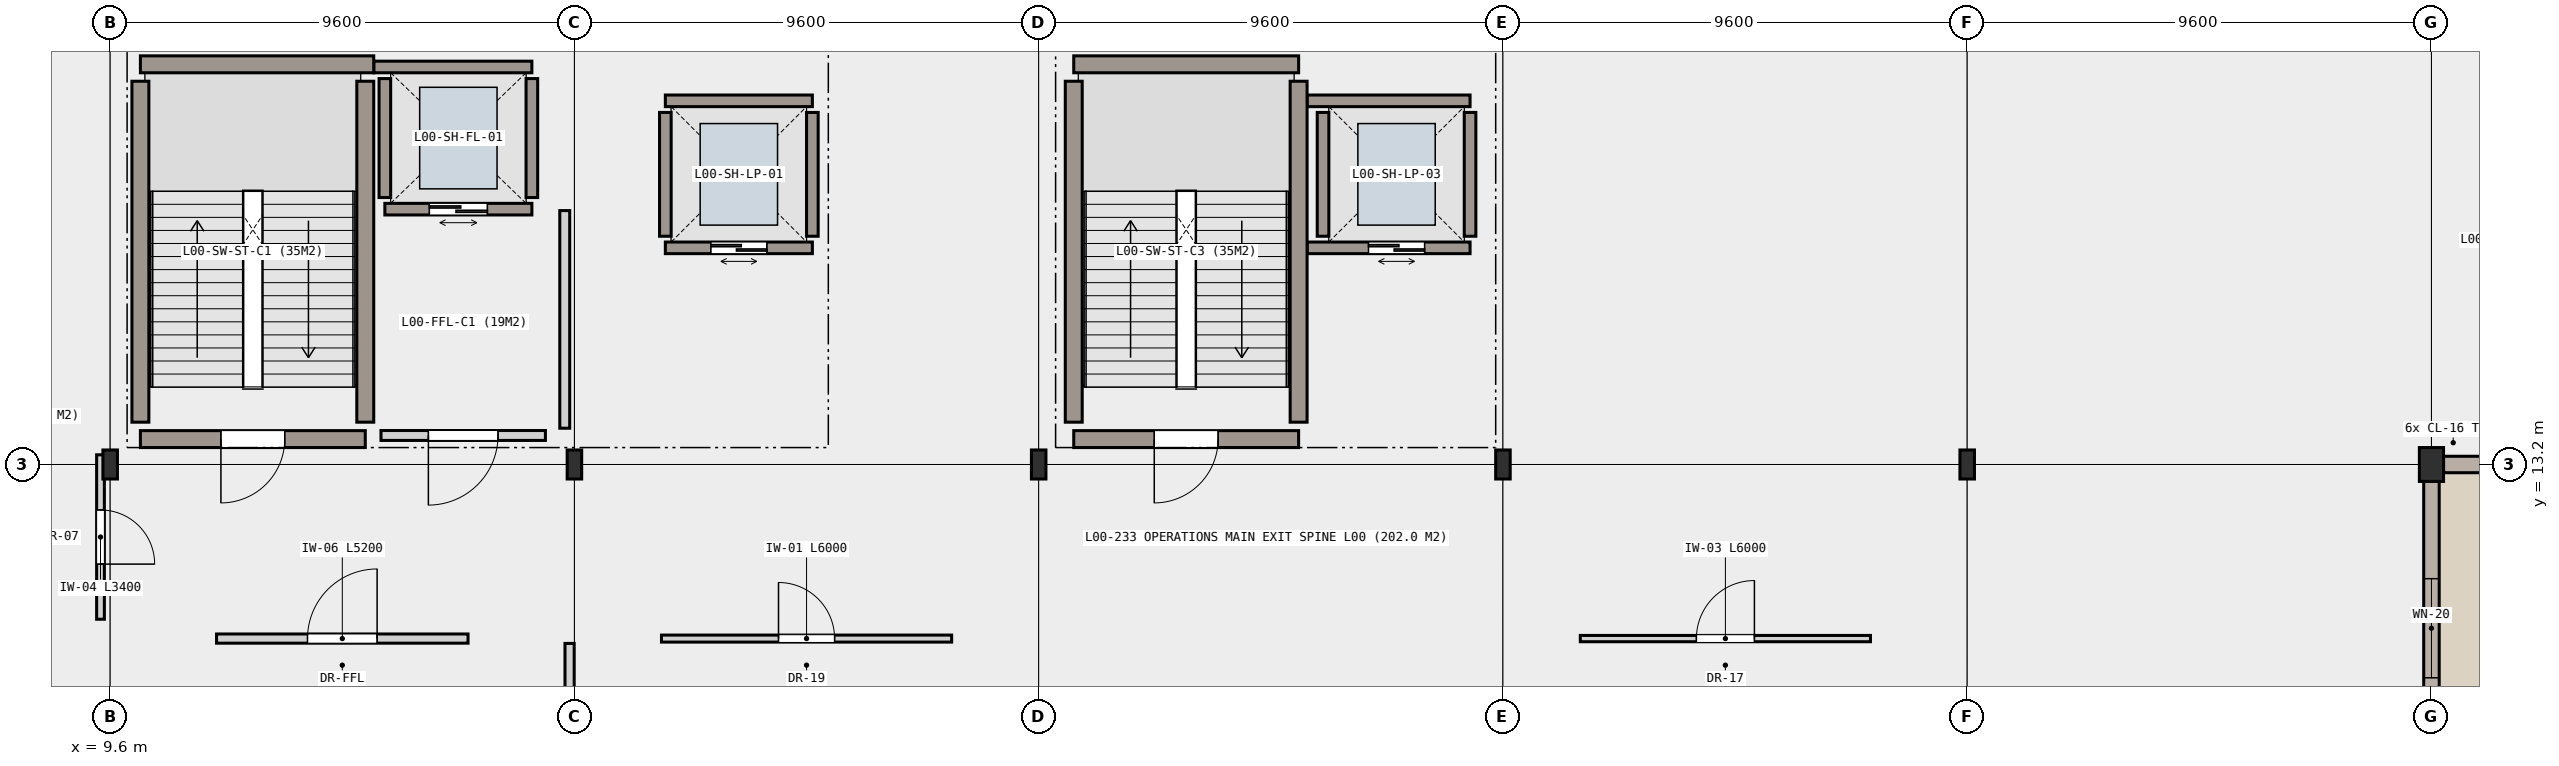
"""IFC4 building model, lengths in metres.
Left out: names, types, materials, properties, quantities, classifications, styles, units other than length and angle.
Written with IfcOpenShell. Run it as: python <this file> out.ifc"""

import sys

from ifc_helpers import new_model, si_unit, direction, frame, frame_2d, origin, origin_2d, place, context, subcontext, project, spatial, rectangle, hollow_rectangle, i_section, extrude, element, fill, save


model = new_model("IFC4")
c1 = context("Model", 3, precision=1e-05, world=origin(), true_north=direction((0.0, 1.0)))
c2 = subcontext(c1, "Body", "Model", "MODEL_VIEW")
j1 = project(units=[si_unit("LENGTHUNIT", "METRE"), si_unit("PLANEANGLEUNIT", "RADIAN")], contexts=[c1])
p1 = place(None, origin())
s1 = spatial("IfcSite", under=j1, at=p1, CompositionType="ELEMENT")
p2 = place(p1, origin())
s2 = spatial("IfcBuilding", under=s1, at=p2, CompositionType="ELEMENT")
p3 = place(p2, origin())
s3 = spatial("IfcBuildingStorey", under=s2, at=p3, CompositionType="ELEMENT", Elevation=0.0)
for number, where, z_axis, x_axis in (
    (1, (9.6, 13.2, 0.0), (0.0, 0.0, 1.0), (1.0, 0.0, 0.0)),
    (2, (19.2, 13.2, 0.0), (0.0, 0.0, 1.0), (1.0, 0.0, 0.0)),
    (3, (28.8, 13.2, 0.0), (0.0, 0.0, 1.0), (1.0, 0.0, 0.0)),
    (4, (38.4, 13.2, 0.0), (0.0, 0.0, 1.0), (1.0, 0.0, 0.0)),
    (5, (48.0, 13.2, 0.0), (0.0, 0.0, 1.0), (1.0, 0.0, 0.0)),
):
    element("IfcColumn", number, at=place(p3, frame(where, z_axis=z_axis, x_axis=x_axis)), inside=s3, PredefinedType="COLUMN", context=c2, shape_type="SweptSolid", body=[
        extrude(i_section(OverallWidth=0.3, OverallDepth=0.6, WebThickness=0.015, FlangeThickness=0.03, FilletRadius=0.027, at=origin_2d()), origin(), (0.0, 0.0, 1.0), 5.4),
    ])
p4 = place(p3, frame((57.6, 13.2, 0.0), z_axis=(0.0, 0.0, 1.0), x_axis=(1.0, 0.0, 0.0)))
e6 = element("IfcColumn", 6, at=p4, inside=s3, PredefinedType="COLUMN", context=c2, shape_type="SweptSolid", body=[
    extrude(hollow_rectangle(XDim=0.5, YDim=0.7, WallThickness=0.032, at=origin_2d()), origin(), (0.0, 0.0, 1.0), 5.4),
])
p5 = place(p3, frame((57.6, 12.85, 0.0), z_axis=(0.0, 0.0, 1.0), x_axis=(0.0, -1.0, 0.0)))
e7 = element("IfcWall", 7, at=p5, inside=s3, PredefinedType="SOLIDWALL", context=c2, shape_type="SweptSolid", body=[
    extrude(rectangle(XDim=6.072, YDim=0.32, at=frame_2d((3.036, 0.0))), origin(), (0.0, 0.0, 1.0), 4.59),
])
p6 = place(p5, frame((2.011, 0.0, 0.85)))
e8 = element("IfcOpeningElement", 8, at=p6, cuts=e7, PredefinedType="OPENING", context=c2, shape_type="SweptSolid", body=[
    extrude(rectangle(XDim=2.05, YDim=2.15, at=frame_2d((1.025, 1.075))), frame((0.0, 0.17, 0.0), z_axis=(0.0, -1.0, 0.0), x_axis=(1.0, 0.0, 0.0)), (0.0, 0.0, 1.0), 0.34),
])
p7 = place(p3, frame((66.95, 13.2, 0.0), z_axis=(0.0, 0.0, 1.0), x_axis=(-1.0, 0.0, 0.0)))
e9 = element("IfcWall", 9, at=p7, inside=s3, PredefinedType="SOLIDWALL", context=c2, shape_type="SweptSolid", body=[
    extrude(rectangle(XDim=9.1, YDim=0.34, at=frame_2d((4.55, 0.0))), origin(), (0.0, 0.0, 1.0), 4.49),
])
p8 = place(p7, frame((3.45, 0.0, 0.0)))
e10 = element("IfcOpeningElement", 10, at=p8, cuts=e9, PredefinedType="OPENING", context=c2, shape_type="SweptSolid", body=[
    extrude(rectangle(XDim=2.2, YDim=2.55, at=frame_2d((1.1, 1.275))), frame((0.0, 0.18, 0.0), z_axis=(0.0, -1.0, 0.0), x_axis=(1.0, 0.0, 0.0)), (0.0, 0.0, 1.0), 0.36),
])
p9 = place(p3, frame((18.32, 18.48, 0.0), z_axis=(0.0, 0.0, 1.0), x_axis=(-1.0, 0.0, 0.0)))
e11 = element("IfcWall", 11, at=p9, inside=s3, PredefinedType="SHEAR", context=c2, shape_type="SweptSolid", body=[
    extrude(rectangle(XDim=3.04, YDim=0.24, at=frame_2d((1.52, 0.0))), origin(), (0.0, 0.0, 1.0), 5.12),
])
p10 = place(p9, frame((0.92, 0.0, 0.0)))
e12 = element("IfcOpeningElement", 12, at=p10, cuts=e11, PredefinedType="OPENING", context=c2, shape_type="SweptSolid", body=[
    extrude(rectangle(XDim=1.2, YDim=2.15, at=frame_2d((0.6, 1.075))), frame((0.0, 0.13, 0.0), z_axis=(0.0, -1.0, 0.0), x_axis=(1.0, 0.0, 0.0)), (0.0, 0.0, 1.0), 0.26),
])
p11 = place(p3, frame((15.05, 21.42, 0.0), z_axis=(0.0, 0.0, 1.0), x_axis=(1.0, 0.0, 0.0)))
e13 = element("IfcWall", 13, at=p11, inside=s3, PredefinedType="SHEAR", context=c2, shape_type="SweptSolid", body=[
    extrude(rectangle(XDim=3.27, YDim=0.24, at=frame_2d((1.635, 0.0))), origin(), (0.0, 0.0, 1.0), 5.12),
])
for number, where, z_axis, x_axis in (
    (14, (15.28, 18.72, 0.0), (0.0, 0.0, 1.0), (0.0, 1.0, 0.0)),
    (15, (18.32, 21.18, 0.0), (0.0, 0.0, 1.0), (0.0, -1.0, 0.0)),
):
    element("IfcWall", number, at=place(p3, frame(where, z_axis=z_axis, x_axis=x_axis)), inside=s3, PredefinedType="SHEAR", context=c2, shape_type="SweptSolid", body=[
        extrude(rectangle(XDim=2.46, YDim=0.24, at=frame_2d((1.23, 0.0))), origin(), (0.0, 0.0, 1.0), 5.12),
    ])
p12 = place(p3, frame((24.12, 17.68, 0.0), z_axis=(0.0, 0.0, 1.0), x_axis=(-1.0, 0.0, 0.0)))
e16 = element("IfcWall", 16, at=p12, inside=s3, PredefinedType="SHEAR", context=c2, shape_type="SweptSolid", body=[
    extrude(rectangle(XDim=3.04, YDim=0.24, at=frame_2d((1.52, 0.0))), origin(), (0.0, 0.0, 1.0), 5.12),
])
p13 = place(p12, frame((0.94, 0.0, 0.0)))
e17 = element("IfcOpeningElement", 17, at=p13, cuts=e16, PredefinedType="OPENING", context=c2, shape_type="SweptSolid", body=[
    extrude(rectangle(XDim=1.16, YDim=2.15, at=frame_2d((0.58, 1.075))), frame((0.0, 0.13, 0.0), z_axis=(0.0, -1.0, 0.0), x_axis=(1.0, 0.0, 0.0)), (0.0, 0.0, 1.0), 0.26),
])
p14 = place(p3, frame((21.08, 20.72, 0.0), z_axis=(0.0, 0.0, 1.0), x_axis=(1.0, 0.0, 0.0)))
e18 = element("IfcWall", 18, at=p14, inside=s3, PredefinedType="SHEAR", context=c2, shape_type="SweptSolid", body=[
    extrude(rectangle(XDim=3.04, YDim=0.24, at=frame_2d((1.52, 0.0))), origin(), (0.0, 0.0, 1.0), 5.12),
])
for number, where, z_axis, x_axis in (
    (19, (21.08, 17.92, 0.0), (0.0, 0.0, 1.0), (0.0, 1.0, 0.0)),
    (20, (24.12, 20.48, 0.0), (0.0, 0.0, 1.0), (0.0, -1.0, 0.0)),
):
    element("IfcWall", number, at=place(p3, frame(where, z_axis=z_axis, x_axis=x_axis)), inside=s3, PredefinedType="SHEAR", context=c2, shape_type="SweptSolid", body=[
        extrude(rectangle(XDim=2.56, YDim=0.24, at=frame_2d((1.28, 0.0))), origin(), (0.0, 0.0, 1.0), 5.12),
    ])
p15 = place(p3, frame((37.72, 17.68, 0.0), z_axis=(0.0, 0.0, 1.0), x_axis=(-1.0, 0.0, 0.0)))
e21 = element("IfcWall", 21, at=p15, inside=s3, PredefinedType="SHEAR", context=c2, shape_type="SweptSolid", body=[
    extrude(rectangle(XDim=3.37, YDim=0.24, at=frame_2d((1.685, 0.0))), origin(), (0.0, 0.0, 1.0), 5.12),
])
p16 = place(p15, frame((0.94, 0.0, 0.0)))
e22 = element("IfcOpeningElement", 22, at=p16, cuts=e21, PredefinedType="OPENING", context=c2, shape_type="SweptSolid", body=[
    extrude(rectangle(XDim=1.16, YDim=2.15, at=frame_2d((0.58, 1.075))), frame((0.0, 0.13, 0.0), z_axis=(0.0, -1.0, 0.0), x_axis=(1.0, 0.0, 0.0)), (0.0, 0.0, 1.0), 0.26),
])
p17 = place(p3, frame((34.35, 20.72, 0.0), z_axis=(0.0, 0.0, 1.0), x_axis=(1.0, 0.0, 0.0)))
e23 = element("IfcWall", 23, at=p17, inside=s3, PredefinedType="SHEAR", context=c2, shape_type="SweptSolid", body=[
    extrude(rectangle(XDim=3.37, YDim=0.24, at=frame_2d((1.685, 0.0))), origin(), (0.0, 0.0, 1.0), 5.12),
])
for number, where, z_axis, x_axis in (
    (24, (34.68, 17.92, 0.0), (0.0, 0.0, 1.0), (0.0, 1.0, 0.0)),
    (25, (37.72, 20.48, 0.0), (0.0, 0.0, 1.0), (0.0, -1.0, 0.0)),
):
    element("IfcWall", number, at=place(p3, frame(where, z_axis=z_axis, x_axis=x_axis)), inside=s3, PredefinedType="SHEAR", context=c2, shape_type="SweptSolid", body=[
        extrude(rectangle(XDim=2.56, YDim=0.24, at=frame_2d((1.28, 0.0))), origin(), (0.0, 0.0, 1.0), 5.12),
    ])
p18 = place(p3, frame((14.875, 13.725, 0.0), z_axis=(0.0, 0.0, 1.0), x_axis=(-1.0, 0.0, 0.0)))
e26 = element("IfcWall", 26, at=p18, inside=s3, PredefinedType="SHEAR", context=c2, shape_type="SweptSolid", body=[
    extrude(rectangle(XDim=4.65, YDim=0.35, at=frame_2d((2.325, 0.0))), origin(), (0.0, 0.0, 1.0), 5.12),
])
p19 = place(p18, frame((1.665, 0.0, 0.0)))
e27 = element("IfcOpeningElement", 27, at=p19, cuts=e26, PredefinedType="OPENING", context=c2, shape_type="SweptSolid", body=[
    extrude(rectangle(XDim=1.32, YDim=2.15, at=frame_2d((0.66, 1.075))), frame((0.0, 0.185, 0.0), z_axis=(0.0, -1.0, 0.0), x_axis=(1.0, 0.0, 0.0)), (0.0, 0.0, 1.0), 0.37),
])
p20 = place(p3, frame((10.225, 21.475, 0.0), z_axis=(0.0, 0.0, 1.0), x_axis=(1.0, 0.0, 0.0)))
e28 = element("IfcWall", 28, at=p20, inside=s3, PredefinedType="SHEAR", context=c2, shape_type="SweptSolid", body=[
    extrude(rectangle(XDim=4.825, YDim=0.35, at=frame_2d((2.413, 0.0))), origin(), (0.0, 0.0, 1.0), 5.12),
])
for number, where, z_axis, x_axis in (
    (29, (10.225, 14.075, 0.0), (0.0, 0.0, 1.0), (0.0, 1.0, 0.0)),
    (30, (14.875, 21.125, 0.0), (0.0, 0.0, 1.0), (0.0, -1.0, 0.0)),
):
    element("IfcWall", number, at=place(p3, frame(where, z_axis=z_axis, x_axis=x_axis)), inside=s3, PredefinedType="SHEAR", context=c2, shape_type="SweptSolid", body=[
        extrude(rectangle(XDim=7.05, YDim=0.35, at=frame_2d((3.525, 0.0))), origin(), (0.0, 0.0, 1.0), 5.12),
    ])
p21 = place(p3, frame((34.175, 13.725, 0.0), z_axis=(0.0, 0.0, 1.0), x_axis=(-1.0, 0.0, 0.0)))
e31 = element("IfcWall", 31, at=p21, inside=s3, PredefinedType="SHEAR", context=c2, shape_type="SweptSolid", body=[
    extrude(rectangle(XDim=4.65, YDim=0.35, at=frame_2d((2.325, 0.0))), origin(), (0.0, 0.0, 1.0), 5.12),
])
p22 = place(p21, frame((1.665, 0.0, 0.0)))
e32 = element("IfcOpeningElement", 32, at=p22, cuts=e31, PredefinedType="OPENING", context=c2, shape_type="SweptSolid", body=[
    extrude(rectangle(XDim=1.32, YDim=2.15, at=frame_2d((0.66, 1.075))), frame((0.0, 0.185, 0.0), z_axis=(0.0, -1.0, 0.0), x_axis=(1.0, 0.0, 0.0)), (0.0, 0.0, 1.0), 0.37),
])
p23 = place(p3, frame((29.525, 21.475, 0.0), z_axis=(0.0, 0.0, 1.0), x_axis=(1.0, 0.0, 0.0)))
e33 = element("IfcWall", 33, at=p23, inside=s3, PredefinedType="SHEAR", context=c2, shape_type="SweptSolid", body=[
    extrude(rectangle(XDim=4.65, YDim=0.35, at=frame_2d((2.325, 0.0))), origin(), (0.0, 0.0, 1.0), 5.12),
])
for number, where, z_axis, x_axis in (
    (34, (29.525, 14.075, 0.0), (0.0, 0.0, 1.0), (0.0, 1.0, 0.0)),
    (35, (34.175, 21.125, 0.0), (0.0, 0.0, 1.0), (0.0, -1.0, 0.0)),
):
    element("IfcWall", number, at=place(p3, frame(where, z_axis=z_axis, x_axis=x_axis)), inside=s3, PredefinedType="SHEAR", context=c2, shape_type="SweptSolid", body=[
        extrude(rectangle(XDim=7.05, YDim=0.35, at=frame_2d((3.525, 0.0))), origin(), (0.0, 0.0, 1.0), 5.12),
    ])
p24 = place(p3, frame((18.6, 13.8, 0.0), z_axis=(0.0, 0.0, 1.0), x_axis=(-1.0, 0.0, 0.0)))
e36 = element("IfcWall", 36, at=p24, inside=s3, PredefinedType="PARTITIONING", context=c2, shape_type="SweptSolid", body=[
    extrude(rectangle(XDim=3.4, YDim=0.205, at=frame_2d((1.7, 0.0))), origin(), (0.0, 0.0, 1.0), 5.12),
])
p25 = place(p24, frame((0.98, 0.0, 0.0)))
e37 = element("IfcOpeningElement", 37, at=p25, cuts=e36, PredefinedType="OPENING", context=c2, shape_type="SweptSolid", body=[
    extrude(rectangle(XDim=1.44, YDim=2.18, at=frame_2d((0.72, 1.09))), frame((0.0, 0.113, 0.0), z_axis=(0.0, -1.0, 0.0), x_axis=(1.0, 0.0, 0.0)), (0.0, 0.0, 1.0), 0.225),
])
p26 = place(p3, frame((19.0, 18.45, 0.0), z_axis=(0.0, 0.0, 1.0), x_axis=(0.0, -1.0, 0.0)))
e38 = element("IfcWall", 38, at=p26, inside=s3, PredefinedType="PARTITIONING", context=c2, shape_type="SweptSolid", body=[
    extrude(rectangle(XDim=4.5, YDim=0.205, at=frame_2d((2.25, 0.0))), origin(), (0.0, 0.0, 1.0), 4.54),
])
p27 = place(p3, frame((11.8, 9.6, 0.0), z_axis=(0.0, 0.0, 1.0), x_axis=(1.0, 0.0, 0.0)))
e39 = element("IfcWall", 39, at=p27, inside=s3, PredefinedType="PARTITIONING", context=c2, shape_type="SweptSolid", body=[
    extrude(rectangle(XDim=5.2, YDim=0.19, at=frame_2d((2.6, 0.0))), origin(), (0.0, 0.0, 1.0), 5.12),
])
p28 = place(p27, frame((1.88, 0.0, 0.0)))
e40 = element("IfcOpeningElement", 40, at=p28, cuts=e39, PredefinedType="OPENING", context=c2, shape_type="SweptSolid", body=[
    extrude(rectangle(XDim=1.44, YDim=2.18, at=frame_2d((0.72, 1.09))), frame((0.0, 0.105, 0.0), z_axis=(0.0, -1.0, 0.0), x_axis=(1.0, 0.0, 0.0)), (0.0, 0.0, 1.0), 0.21),
])
p29 = place(p3, frame((19.1, 9.5, 0.0), z_axis=(0.0, 0.0, 1.0), x_axis=(0.0, -1.0, 0.0)))
e41 = element("IfcWall", 41, at=p29, inside=s3, PredefinedType="PARTITIONING", context=c2, shape_type="SweptSolid", body=[
    extrude(rectangle(XDim=2.5, YDim=0.19, at=frame_2d((1.25, 0.0))), origin(), (0.0, 0.0, 1.0), 4.59),
])
p30 = place(p3, frame((9.4, 13.4, 0.0), z_axis=(0.0, 0.0, 1.0), x_axis=(0.0, -1.0, 0.0)))
e42 = element("IfcWall", 42, at=p30, inside=s3, PredefinedType="PARTITIONING", context=c2, shape_type="SweptSolid", body=[
    extrude(rectangle(XDim=3.4, YDim=0.16, at=frame_2d((1.7, 0.0))), origin(), (0.0, 0.0, 1.0), 4.59),
])
p31 = place(p30, frame((1.14, 0.0, 0.0)))
e43 = element("IfcOpeningElement", 43, at=p31, cuts=e42, PredefinedType="OPENING", context=c2, shape_type="SweptSolid", body=[
    extrude(rectangle(XDim=1.12, YDim=2.15, at=frame_2d((0.56, 1.075))), frame((0.0, 0.09, 0.0), z_axis=(0.0, -1.0, 0.0), x_axis=(1.0, 0.0, 0.0)), (0.0, 0.0, 1.0), 0.18),
])
p32 = place(p3, frame((21.0, 9.6, 0.0), z_axis=(0.0, 0.0, 1.0), x_axis=(1.0, 0.0, 0.0)))
e44 = element("IfcWall", 44, at=p32, inside=s3, PredefinedType="PARTITIONING", context=c2, shape_type="SweptSolid", body=[
    extrude(rectangle(XDim=6.0, YDim=0.145, at=frame_2d((3.0, 0.0))), origin(), (0.0, 0.0, 1.0), 5.12),
])
p33 = place(p32, frame((2.42, 0.0, 0.0)))
e45 = element("IfcOpeningElement", 45, at=p33, cuts=e44, PredefinedType="OPENING", context=c2, shape_type="SweptSolid", body=[
    extrude(rectangle(XDim=1.16, YDim=2.15, at=frame_2d((0.58, 1.075))), frame((0.0, 0.083, 0.0), z_axis=(0.0, -1.0, 0.0), x_axis=(1.0, 0.0, 0.0)), (0.0, 0.0, 1.0), 0.165),
])
p34 = place(p3, frame((40.0, 9.6, 0.0), z_axis=(0.0, 0.0, 1.0), x_axis=(1.0, 0.0, 0.0)))
e46 = element("IfcWall", 46, at=p34, inside=s3, PredefinedType="PARTITIONING", context=c2, shape_type="SweptSolid", body=[
    extrude(rectangle(XDim=6.0, YDim=0.13, at=frame_2d((3.0, 0.0))), origin(), (0.0, 0.0, 1.0), 5.12),
])
p35 = place(p34, frame((2.4, 0.0, 0.0)))
e47 = element("IfcOpeningElement", 47, at=p35, cuts=e46, PredefinedType="OPENING", context=c2, shape_type="SweptSolid", body=[
    extrude(rectangle(XDim=1.2, YDim=2.15, at=frame_2d((0.6, 1.075))), frame((0.0, 0.075, 0.0), z_axis=(0.0, -1.0, 0.0), x_axis=(1.0, 0.0, 0.0)), (0.0, 0.0, 1.0), 0.15),
])
p36 = place(p6, origin())
e48 = element("IfcWindow", 48, at=p36, inside=s3, PartitioningType="SINGLE_PANEL", PredefinedType="WINDOW", context=c2, shape_type="SweptSolid", body=[
    extrude(rectangle(XDim=2.05, YDim=2.15, at=frame_2d((1.025, 1.075))), frame((0.0, 0.03, 0.0), z_axis=(0.0, -1.0, 0.0), x_axis=(1.0, 0.0, 0.0)), (0.0, 0.0, 1.0), 0.06),
])
fill(e8, e48)
p37 = place(p10, origin())
e49 = element("IfcDoor", 49, at=p37, inside=s3, OperationType="DOUBLE_DOOR_SLIDING", PredefinedType="DOOR", context=c2, shape_type="SweptSolid", body=[
    extrude(rectangle(XDim=1.2, YDim=2.15, at=frame_2d((0.6, 1.075))), frame((0.0, 0.025, 0.0), z_axis=(0.0, -1.0, 0.0), x_axis=(1.0, 0.0, 0.0)), (0.0, 0.0, 1.0), 0.05),
])
fill(e12, e49)
p38 = place(p13, origin())
e50 = element("IfcDoor", 50, at=p38, inside=s3, OperationType="DOUBLE_DOOR_SLIDING", PredefinedType="DOOR", context=c2, shape_type="SweptSolid", body=[
    extrude(rectangle(XDim=1.16, YDim=2.15, at=frame_2d((0.58, 1.075))), frame((0.0, 0.025, 0.0), z_axis=(0.0, -1.0, 0.0), x_axis=(1.0, 0.0, 0.0)), (0.0, 0.0, 1.0), 0.05),
])
fill(e17, e50)
p39 = place(p16, origin())
e51 = element("IfcDoor", 51, at=p39, inside=s3, OperationType="DOUBLE_DOOR_SLIDING", PredefinedType="DOOR", context=c2, shape_type="SweptSolid", body=[
    extrude(rectangle(XDim=1.16, YDim=2.15, at=frame_2d((0.58, 1.075))), frame((0.0, 0.025, 0.0), z_axis=(0.0, -1.0, 0.0), x_axis=(1.0, 0.0, 0.0)), (0.0, 0.0, 1.0), 0.05),
])
fill(e22, e51)
p40 = place(p19, origin())
e52 = element("IfcDoor", 52, at=p40, inside=s3, OperationType="SINGLE_SWING_RIGHT", PredefinedType="DOOR", context=c2, shape_type="SweptSolid", body=[
    extrude(rectangle(XDim=1.32, YDim=2.15, at=frame_2d((0.66, 1.075))), frame((0.0, 0.025, 0.0), z_axis=(0.0, -1.0, 0.0), x_axis=(1.0, 0.0, 0.0)), (0.0, 0.0, 1.0), 0.05),
])
fill(e27, e52)
p41 = place(p22, origin())
e53 = element("IfcDoor", 53, at=p41, inside=s3, OperationType="SINGLE_SWING_RIGHT", PredefinedType="DOOR", context=c2, shape_type="SweptSolid", body=[
    extrude(rectangle(XDim=1.32, YDim=2.15, at=frame_2d((0.66, 1.075))), frame((0.0, 0.025, 0.0), z_axis=(0.0, -1.0, 0.0), x_axis=(1.0, 0.0, 0.0)), (0.0, 0.0, 1.0), 0.05),
])
fill(e32, e53)
p42 = place(p25, origin())
e54 = element("IfcDoor", 54, at=p42, inside=s3, OperationType="SINGLE_SWING_RIGHT", PredefinedType="DOOR", context=c2, shape_type="SweptSolid", body=[
    extrude(rectangle(XDim=1.44, YDim=2.18, at=frame_2d((0.72, 1.09))), frame((0.0, 0.025, 0.0), z_axis=(0.0, -1.0, 0.0), x_axis=(1.0, 0.0, 0.0)), (0.0, 0.0, 1.0), 0.05),
])
fill(e37, e54)
p43 = place(p28, origin())
e55 = element("IfcDoor", 55, at=p43, inside=s3, OperationType="SINGLE_SWING_RIGHT", PredefinedType="DOOR", context=c2, shape_type="SweptSolid", body=[
    extrude(rectangle(XDim=1.44, YDim=2.18, at=frame_2d((0.72, 1.09))), frame((0.0, 0.025, 0.0), z_axis=(0.0, -1.0, 0.0), x_axis=(1.0, 0.0, 0.0)), (0.0, 0.0, 1.0), 0.05),
])
fill(e40, e55)
p44 = place(p31, origin())
e56 = element("IfcDoor", 56, at=p44, inside=s3, OperationType="SINGLE_SWING_RIGHT", PredefinedType="DOOR", context=c2, shape_type="SweptSolid", body=[
    extrude(rectangle(XDim=1.12, YDim=2.15, at=frame_2d((0.56, 1.075))), frame((0.0, 0.025, 0.0), z_axis=(0.0, -1.0, 0.0), x_axis=(1.0, 0.0, 0.0)), (0.0, 0.0, 1.0), 0.05),
])
fill(e43, e56)
p45 = place(p33, origin())
e57 = element("IfcDoor", 57, at=p45, inside=s3, OperationType="SINGLE_SWING_LEFT", PredefinedType="DOOR", context=c2, shape_type="SweptSolid", body=[
    extrude(rectangle(XDim=1.16, YDim=2.15, at=frame_2d((0.58, 1.075))), frame((0.0, 0.025, 0.0), z_axis=(0.0, -1.0, 0.0), x_axis=(1.0, 0.0, 0.0)), (0.0, 0.0, 1.0), 0.05),
])
fill(e45, e57)
p46 = place(p35, origin())
e58 = element("IfcDoor", 58, at=p46, inside=s3, OperationType="SINGLE_SWING_RIGHT", PredefinedType="DOOR", context=c2, shape_type="SweptSolid", body=[
    extrude(rectangle(XDim=1.2, YDim=2.15, at=frame_2d((0.6, 1.075))), frame((0.0, 0.025, 0.0), z_axis=(0.0, -1.0, 0.0), x_axis=(1.0, 0.0, 0.0)), (0.0, 0.0, 1.0), 0.05),
])
fill(e47, e58)
save(model, sys.argv[1])
